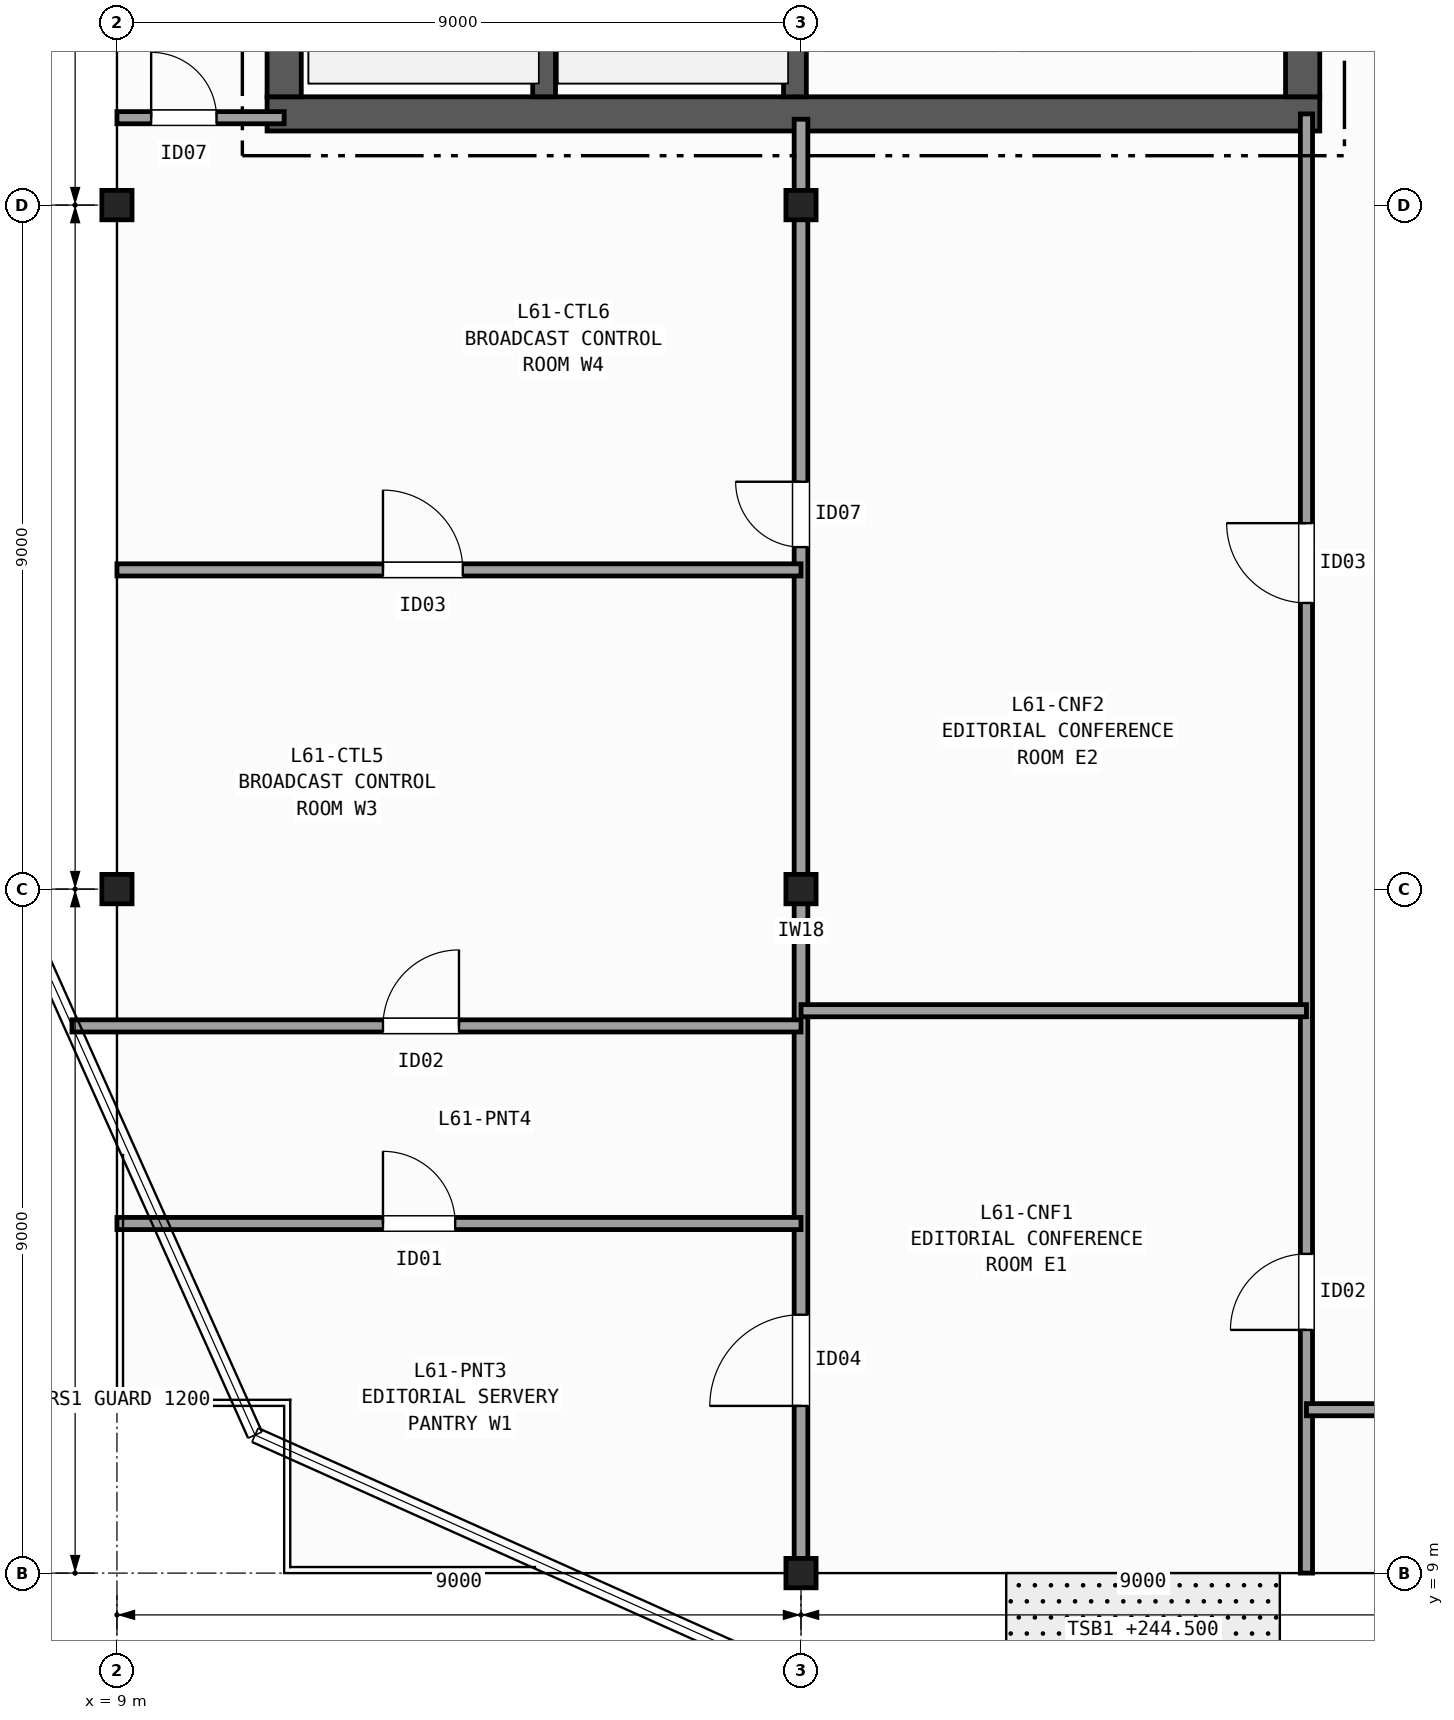
"""IFC4 building model, lengths in metres.
Left out: names, types, materials, properties, quantities, classifications, styles, units other than length and angle.
Written with IfcOpenShell. Run it as: python <this file> out.ifc"""

import sys

from ifc_helpers import new_model, si_unit, direction, frame, frame_2d, origin, origin_2d, place, context, subcontext, project, spatial, rectangle, i_section, extrude, element, fill, save


model = new_model("IFC4")
c1 = context("Model", 3, precision=1e-05, world=origin(), true_north=direction((0.0, 1.0)))
c2 = subcontext(c1, "Body", "Model", "MODEL_VIEW")
j1 = project(units=[si_unit("LENGTHUNIT", "METRE"), si_unit("PLANEANGLEUNIT", "RADIAN")], contexts=[c1])
p1 = place(None, origin())
s1 = spatial("IfcSite", under=j1, at=p1, CompositionType="ELEMENT")
p2 = place(p1, origin())
s2 = spatial("IfcBuilding", under=s1, at=p2, CompositionType="ELEMENT")
p3 = place(p2, frame((0.0, 0.0, 244.5)))
s3 = spatial("IfcBuildingStorey", under=s2, at=p3, CompositionType="ELEMENT", Elevation=244.5)
for number, where, z_axis, x_axis in (
    (1, (9.0, 18.0, 0.0), (0.0, 0.0, 1.0), (1.0, 0.0, 0.0)),
    (2, (9.0, 27.0, 0.0), (0.0, 0.0, 1.0), (1.0, 0.0, 0.0)),
    (3, (18.0, 9.0, 0.0), (0.0, 0.0, 1.0), (1.0, 0.0, 0.0)),
    (4, (18.0, 18.0, 0.0), (0.0, 0.0, 1.0), (1.0, 0.0, 0.0)),
    (5, (18.0, 27.0, 0.0), (0.0, 0.0, 1.0), (1.0, 0.0, 0.0)),
):
    element("IfcColumn", number, at=place(p3, frame(where, z_axis=z_axis, x_axis=x_axis)), inside=s3, PredefinedType="COLUMN", context=c2, shape_type="SweptSolid", body=[
        extrude(i_section(OverallWidth=0.397, OverallDepth=0.387, WebThickness=0.021, FlangeThickness=0.033, FilletRadius=0.015, at=origin_2d()), origin(), (0.0, 0.0, 1.0), 3.7),
    ])
p4 = place(p3, frame((10.975, 28.2, 0.0), z_axis=(0.0, 0.0, 1.0), x_axis=(1.0, 0.0, 0.0)))
e6 = element("IfcWall", 6, at=p4, inside=s3, PredefinedType="SHEAR", context=c2, shape_type="SweptSolid", body=[
    extrude(rectangle(XDim=13.85, YDim=0.45, at=frame_2d((6.925, 0.0))), origin(), (0.0, 0.0, 1.0), 3.42),
])
p5 = place(p3, frame((11.2, 42.175, 0.0), z_axis=(0.0, 0.0, 1.0), x_axis=(0.0, -1.0, 0.0)))
e7 = element("IfcWall", 7, at=p5, inside=s3, PredefinedType="SHEAR", context=c2, shape_type="SweptSolid", body=[
    extrude(rectangle(XDim=13.75, YDim=0.45, at=frame_2d((6.875, 0.0))), origin(), (0.0, 0.0, 1.0), 3.42),
])
p6 = place(p3, frame((24.6, 28.425, 0.0), z_axis=(0.0, 0.0, 1.0), x_axis=(0.0, 1.0, 0.0)))
e8 = element("IfcWall", 8, at=p6, inside=s3, PredefinedType="SHEAR", context=c2, shape_type="SweptSolid", body=[
    extrude(rectangle(XDim=13.75, YDim=0.45, at=frame_2d((6.875, 0.0))), origin(), (0.0, 0.0, 1.0), 3.42),
])
p7 = place(p6, frame((3.375, 0.0, 0.0)))
e9 = element("IfcOpeningElement", 9, at=p7, cuts=e8, PredefinedType="OPENING", context=c2, shape_type="SweptSolid", body=[
    extrude(rectangle(XDim=1.5, YDim=2.2, at=frame_2d((0.75, 1.1))), frame((0.0, 0.235, 0.0), z_axis=(0.0, -1.0, 0.0), x_axis=(1.0, 0.0, 0.0)), (0.0, 0.0, 1.0), 0.47),
])
p8 = place(p6, frame((9.975, 0.0, 0.0)))
e10 = element("IfcOpeningElement", 10, at=p8, cuts=e8, PredefinedType="OPENING", context=c2, shape_type="SweptSolid", body=[
    extrude(rectangle(XDim=0.9, YDim=2.1, at=frame_2d((0.45, 1.05))), frame((0.0, 0.235, 0.0), z_axis=(0.0, -1.0, 0.0), x_axis=(1.0, 0.0, 0.0)), (0.0, 0.0, 1.0), 0.47),
])
p9 = place(p3, frame((14.62, 28.425, 0.0), z_axis=(0.0, 0.0, 1.0), x_axis=(0.0, 1.0, 0.0)))
e11 = element("IfcWall", 11, at=p9, inside=s3, PredefinedType="SHEAR", context=c2, shape_type="SweptSolid", body=[
    extrude(rectangle(XDim=9.025, YDim=0.3, at=frame_2d((4.512, 0.0))), origin(), (0.0, 0.0, 1.0), 3.42),
])
p10 = place(p3, frame((17.92, 42.175, 0.0), z_axis=(0.0, 0.0, 1.0), x_axis=(0.0, -1.0, 0.0)))
e12 = element("IfcWall", 12, at=p10, inside=s3, PredefinedType="SHEAR", context=c2, shape_type="SweptSolid", body=[
    extrude(rectangle(XDim=13.75, YDim=0.3, at=frame_2d((6.875, 0.0))), origin(), (0.0, 0.0, 1.0), 3.42),
])
p11 = place(p10, frame((2.0, 0.0, 0.0)))
e13 = element("IfcOpeningElement", 13, at=p11, cuts=e12, PredefinedType="OPENING", context=c2, shape_type="SweptSolid", body=[
    extrude(rectangle(XDim=1.15, YDim=2.15, at=frame_2d((0.575, 1.075))), frame((0.0, 0.16, 0.0), z_axis=(0.0, -1.0, 0.0), x_axis=(1.0, 0.0, 0.0)), (0.0, 0.0, 1.0), 0.32),
])
p12 = place(p3, frame((9.0, 28.15, 0.0), z_axis=(0.0, 0.0, 1.0), x_axis=(1.0, 0.0, 0.0)))
e14 = element("IfcWall", 14, at=p12, inside=s3, PredefinedType="PARTITIONING", context=c2, shape_type="SweptSolid", body=[
    extrude(rectangle(XDim=2.2, YDim=0.16, at=frame_2d((1.1, 0.0))), origin(), (0.0, 0.0, 1.0), 2.707),
])
p13 = place(p12, frame((0.45, 0.0, 0.0)))
e15 = element("IfcOpeningElement", 15, at=p13, cuts=e14, PredefinedType="OPENING", context=c2, shape_type="SweptSolid", body=[
    extrude(rectangle(XDim=0.86, YDim=2.05, at=frame_2d((0.43, 1.025))), frame((0.0, 0.09, 0.0), z_axis=(0.0, -1.0, 0.0), x_axis=(1.0, 0.0, 0.0)), (0.0, 0.0, 1.0), 0.18),
])
p14 = place(p3, frame((24.65, 9.0, 0.0), z_axis=(0.0, 0.0, 1.0), x_axis=(0.0, 1.0, 0.0)))
e16 = element("IfcWall", 16, at=p14, inside=s3, PredefinedType="PARTITIONING", context=c2, shape_type="SweptSolid", body=[
    extrude(rectangle(XDim=19.2, YDim=0.16, at=frame_2d((9.6, 0.0))), origin(), (0.0, 0.0, 1.0), 2.707),
])
p15 = place(p14, frame((3.2, 0.0, 0.0)))
e17 = element("IfcOpeningElement", 17, at=p15, cuts=e16, PredefinedType="OPENING", context=c2, shape_type="SweptSolid", body=[
    extrude(rectangle(XDim=1.0, YDim=2.1, at=frame_2d((0.5, 1.05))), frame((0.0, 0.09, 0.0), z_axis=(0.0, -1.0, 0.0), x_axis=(1.0, 0.0, 0.0)), (0.0, 0.0, 1.0), 0.18),
])
p16 = place(p14, frame((12.765, 0.0, 0.0)))
e18 = element("IfcOpeningElement", 18, at=p16, cuts=e16, PredefinedType="OPENING", context=c2, shape_type="SweptSolid", body=[
    extrude(rectangle(XDim=1.05, YDim=2.15, at=frame_2d((0.525, 1.075))), frame((0.0, 0.09, 0.0), z_axis=(0.0, -1.0, 0.0), x_axis=(1.0, 0.0, 0.0)), (0.0, 0.0, 1.0), 0.18),
])
p17 = place(p3, frame((18.0, 9.0, 0.0), z_axis=(0.0, 0.0, 1.0), x_axis=(0.0, 1.0, 0.0)))
e19 = element("IfcWall", 19, at=p17, inside=s3, PredefinedType="PARTITIONING", context=c2, shape_type="SweptSolid", body=[
    extrude(rectangle(XDim=19.13, YDim=0.18, at=frame_2d((9.565, 0.0))), origin(), (0.0, 0.0, 1.0), 2.707),
])
p18 = place(p17, frame((2.2, 0.0, 0.0)))
e20 = element("IfcOpeningElement", 20, at=p18, cuts=e19, PredefinedType="OPENING", context=c2, shape_type="SweptSolid", body=[
    extrude(rectangle(XDim=1.2, YDim=2.15, at=frame_2d((0.6, 1.075))), frame((0.0, 0.1, 0.0), z_axis=(0.0, -1.0, 0.0), x_axis=(1.0, 0.0, 0.0)), (0.0, 0.0, 1.0), 0.2),
])
p19 = place(p17, frame((13.5, 0.0, 0.0)))
e21 = element("IfcOpeningElement", 21, at=p19, cuts=e19, PredefinedType="OPENING", context=c2, shape_type="SweptSolid", body=[
    extrude(rectangle(XDim=0.86, YDim=2.05, at=frame_2d((0.43, 1.025))), frame((0.0, 0.1, 0.0), z_axis=(0.0, -1.0, 0.0), x_axis=(1.0, 0.0, 0.0)), (0.0, 0.0, 1.0), 0.2),
])
p20 = place(p3, frame((18.0, 16.4, 0.0), z_axis=(0.0, 0.0, 1.0), x_axis=(1.0, 0.0, 0.0)))
e22 = element("IfcWall", 22, at=p20, inside=s3, PredefinedType="PARTITIONING", context=c2, shape_type="SweptSolid", body=[
    extrude(rectangle(XDim=6.65, YDim=0.16, at=frame_2d((3.325, 0.0))), origin(), (0.0, 0.0, 1.0), 2.792),
])
p21 = place(p3, frame((9.0, 13.6, 0.0), z_axis=(0.0, 0.0, 1.0), x_axis=(1.0, 0.0, 0.0)))
e23 = element("IfcWall", 23, at=p21, inside=s3, PredefinedType="PARTITIONING", context=c2, shape_type="SweptSolid", body=[
    extrude(rectangle(XDim=9.0, YDim=0.16, at=frame_2d((4.5, 0.0))), origin(), (0.0, 0.0, 1.0), 2.792),
])
p22 = place(p21, frame((3.5, 0.0, 0.0)))
e24 = element("IfcOpeningElement", 24, at=p22, cuts=e23, PredefinedType="OPENING", context=c2, shape_type="SweptSolid", body=[
    extrude(rectangle(XDim=0.95, YDim=2.1, at=frame_2d((0.475, 1.05))), frame((0.0, 0.09, 0.0), z_axis=(0.0, -1.0, 0.0), x_axis=(1.0, 0.0, 0.0)), (0.0, 0.0, 1.0), 0.18),
])
p23 = place(p3, frame((8.408, 16.2, 0.0), z_axis=(0.0, 0.0, 1.0), x_axis=(1.0, 0.0, 0.0)))
e25 = element("IfcWall", 25, at=p23, inside=s3, PredefinedType="PARTITIONING", context=c2, shape_type="SweptSolid", body=[
    extrude(rectangle(XDim=9.592, YDim=0.16, at=frame_2d((4.796, 0.0))), origin(), (0.0, 0.0, 1.0), 2.792),
])
p24 = place(p23, frame((4.092, 0.0, 0.0)))
e26 = element("IfcOpeningElement", 26, at=p24, cuts=e25, PredefinedType="OPENING", context=c2, shape_type="SweptSolid", body=[
    extrude(rectangle(XDim=1.0, YDim=2.1, at=frame_2d((0.5, 1.05))), frame((0.0, 0.09, 0.0), z_axis=(0.0, -1.0, 0.0), x_axis=(1.0, 0.0, 0.0)), (0.0, 0.0, 1.0), 0.18),
])
p25 = place(p3, frame((9.0, 22.2, 0.0), z_axis=(0.0, 0.0, 1.0), x_axis=(1.0, 0.0, 0.0)))
e27 = element("IfcWall", 27, at=p25, inside=s3, PredefinedType="PARTITIONING", context=c2, shape_type="SweptSolid", body=[
    extrude(rectangle(XDim=9.0, YDim=0.16, at=frame_2d((4.5, 0.0))), origin(), (0.0, 0.0, 1.0), 2.707),
])
p26 = place(p25, frame((3.5, 0.0, 0.0)))
e28 = element("IfcOpeningElement", 28, at=p26, cuts=e27, PredefinedType="OPENING", context=c2, shape_type="SweptSolid", body=[
    extrude(rectangle(XDim=1.05, YDim=2.15, at=frame_2d((0.525, 1.075))), frame((0.0, 0.09, 0.0), z_axis=(0.0, -1.0, 0.0), x_axis=(1.0, 0.0, 0.0)), (0.0, 0.0, 1.0), 0.18),
])
p27 = place(p3, frame((24.65, 11.15, 0.0), z_axis=(0.0, 0.0, 1.0), x_axis=(1.0, 0.0, 0.0)))
e29 = element("IfcWall", 29, at=p27, inside=s3, PredefinedType="PARTITIONING", context=c2, shape_type="SweptSolid", body=[
    extrude(rectangle(XDim=4.75, YDim=0.16, at=frame_2d((2.375, 0.0))), origin(), (0.0, 0.0, 1.0), 2.792),
])
p28 = place(p27, frame((1.2, 0.0, 0.0)))
e30 = element("IfcOpeningElement", 30, at=p28, cuts=e29, PredefinedType="OPENING", context=c2, shape_type="SweptSolid", body=[
    extrude(rectangle(XDim=1.2, YDim=2.15, at=frame_2d((0.6, 1.075))), frame((0.0, 0.09, 0.0), z_axis=(0.0, -1.0, 0.0), x_axis=(1.0, 0.0, 0.0)), (0.0, 0.0, 1.0), 0.18),
])
p29 = place(p13, origin())
e31 = element("IfcDoor", 31, at=p29, inside=s3, OperationType="SINGLE_SWING_LEFT", PredefinedType="DOOR", context=c2, shape_type="SweptSolid", body=[
    extrude(rectangle(XDim=0.86, YDim=2.05, at=frame_2d((0.43, 1.025))), frame((0.0, 0.025, 0.0), z_axis=(0.0, -1.0, 0.0), x_axis=(1.0, 0.0, 0.0)), (0.0, 0.0, 1.0), 0.05),
])
fill(e15, e31)
p30 = place(p15, origin())
e32 = element("IfcDoor", 32, at=p30, inside=s3, OperationType="SINGLE_SWING_LEFT", PredefinedType="DOOR", context=c2, shape_type="SweptSolid", body=[
    extrude(rectangle(XDim=1.0, YDim=2.1, at=frame_2d((0.5, 1.05))), frame((0.0, 0.025, 0.0), z_axis=(0.0, -1.0, 0.0), x_axis=(1.0, 0.0, 0.0)), (0.0, 0.0, 1.0), 0.05),
])
fill(e17, e32)
p31 = place(p16, origin())
e33 = element("IfcDoor", 33, at=p31, inside=s3, OperationType="SINGLE_SWING_RIGHT", PredefinedType="DOOR", context=c2, shape_type="SweptSolid", body=[
    extrude(rectangle(XDim=1.05, YDim=2.15, at=frame_2d((0.525, 1.075))), frame((0.0, 0.025, 0.0), z_axis=(0.0, -1.0, 0.0), x_axis=(1.0, 0.0, 0.0)), (0.0, 0.0, 1.0), 0.05),
])
fill(e18, e33)
p32 = place(p18, origin())
e34 = element("IfcDoor", 34, at=p32, inside=s3, OperationType="SINGLE_SWING_LEFT", PredefinedType="DOOR", context=c2, shape_type="SweptSolid", body=[
    extrude(rectangle(XDim=1.2, YDim=2.15, at=frame_2d((0.6, 1.075))), frame((0.0, 0.025, 0.0), z_axis=(0.0, -1.0, 0.0), x_axis=(1.0, 0.0, 0.0)), (0.0, 0.0, 1.0), 0.05),
])
fill(e20, e34)
p33 = place(p19, origin())
e35 = element("IfcDoor", 35, at=p33, inside=s3, OperationType="SINGLE_SWING_RIGHT", PredefinedType="DOOR", context=c2, shape_type="SweptSolid", body=[
    extrude(rectangle(XDim=0.86, YDim=2.05, at=frame_2d((0.43, 1.025))), frame((0.0, 0.025, 0.0), z_axis=(0.0, -1.0, 0.0), x_axis=(1.0, 0.0, 0.0)), (0.0, 0.0, 1.0), 0.05),
])
fill(e21, e35)
p34 = place(p22, origin())
e36 = element("IfcDoor", 36, at=p34, inside=s3, OperationType="SINGLE_SWING_LEFT", PredefinedType="DOOR", context=c2, shape_type="SweptSolid", body=[
    extrude(rectangle(XDim=0.95, YDim=2.1, at=frame_2d((0.475, 1.05))), frame((0.0, 0.025, 0.0), z_axis=(0.0, -1.0, 0.0), x_axis=(1.0, 0.0, 0.0)), (0.0, 0.0, 1.0), 0.05),
])
fill(e24, e36)
p35 = place(p24, origin())
e37 = element("IfcDoor", 37, at=p35, inside=s3, OperationType="SINGLE_SWING_RIGHT", PredefinedType="DOOR", context=c2, shape_type="SweptSolid", body=[
    extrude(rectangle(XDim=1.0, YDim=2.1, at=frame_2d((0.5, 1.05))), frame((0.0, 0.025, 0.0), z_axis=(0.0, -1.0, 0.0), x_axis=(1.0, 0.0, 0.0)), (0.0, 0.0, 1.0), 0.05),
])
fill(e26, e37)
p36 = place(p26, origin())
e38 = element("IfcDoor", 38, at=p36, inside=s3, OperationType="SINGLE_SWING_LEFT", PredefinedType="DOOR", context=c2, shape_type="SweptSolid", body=[
    extrude(rectangle(XDim=1.05, YDim=2.15, at=frame_2d((0.525, 1.075))), frame((0.0, 0.025, 0.0), z_axis=(0.0, -1.0, 0.0), x_axis=(1.0, 0.0, 0.0)), (0.0, 0.0, 1.0), 0.05),
])
fill(e28, e38)
save(model, sys.argv[1])
